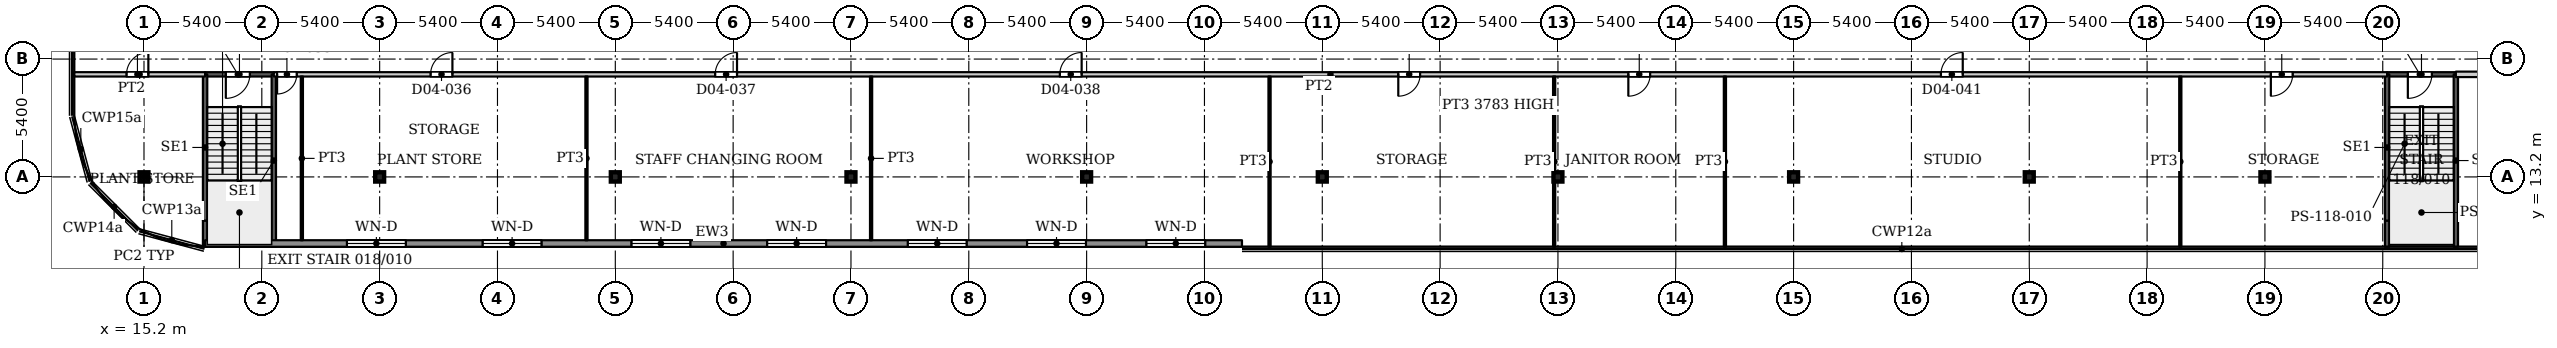
"""IFC4 building model, lengths in metres.
Left out: names, types, materials, properties, quantities, classifications, styles, units other than length and angle.
Written with IfcOpenShell. Run it as: python <this file> out.ifc"""

import sys

from ifc_helpers import new_model, si_unit, direction, frame, frame_2d, origin, origin_2d, place, context, subcontext, project, spatial, rectangle, i_section, extrude, source, transform, mapped, element, fill, save


model = new_model("IFC4")
c1 = context("Model", 3, precision=1e-05, world=origin(), true_north=direction((0.0, 1.0)))
c2 = subcontext(c1, "Body", "Model", "MODEL_VIEW")
j1 = project(units=[si_unit("LENGTHUNIT", "METRE"), si_unit("PLANEANGLEUNIT", "RADIAN")], contexts=[c1])
p1 = place(None, origin())
s1 = spatial("IfcSite", under=j1, at=p1, CompositionType="ELEMENT")
p2 = place(p1, origin())
s2 = spatial("IfcBuilding", under=s1, at=p2, CompositionType="ELEMENT")
p3 = place(p2, frame((0.0, 0.0, 21.5)))
s3 = spatial("IfcBuildingStorey", under=s2, at=p3, CompositionType="ELEMENT", Elevation=21.5)
for number, where, z_axis, x_axis in (
    (1, (15.2, 13.2, 0.0), (0.0, 0.0, 1.0), (1.0, 0.0, 0.0)),
    (2, (26.0, 13.2, 0.0), (0.0, 0.0, 1.0), (1.0, 0.0, 0.0)),
    (3, (36.8, 13.2, 0.0), (0.0, 0.0, 1.0), (1.0, 0.0, 0.0)),
    (4, (47.6, 13.2, 0.0), (0.0, 0.0, 1.0), (1.0, 0.0, 0.0)),
    (5, (58.4, 13.2, 0.0), (0.0, 0.0, 1.0), (1.0, 0.0, 0.0)),
    (6, (69.2, 13.2, 0.0), (0.0, 0.0, 1.0), (1.0, 0.0, 0.0)),
    (7, (80.0, 13.2, 0.0), (0.0, 0.0, 1.0), (1.0, 0.0, 0.0)),
    (8, (90.8, 13.2, 0.0), (0.0, 0.0, 1.0), (1.0, 0.0, 0.0)),
    (9, (101.6, 13.2, 0.0), (0.0, 0.0, 1.0), (1.0, 0.0, 0.0)),
    (10, (112.4, 13.2, 0.0), (0.0, 0.0, 1.0), (1.0, 0.0, 0.0)),
):
    element("IfcColumn", number, at=place(p3, frame(where, z_axis=z_axis, x_axis=x_axis)), inside=s3, PredefinedType="COLUMN", context=c2, shape_type="SweptSolid", body=[
        extrude(i_section(OverallWidth=0.409, OverallDepth=0.425, WebThickness=0.033, FlangeThickness=0.052, FilletRadius=0.013, at=origin_2d()), origin(), (0.0, 0.0, 1.0), 4.5),
    ])
p4 = place(p3, frame((65.52, 10.15, 0.0), z_axis=(0.0, 0.0, 1.0), x_axis=(-1.0, 0.0, 0.0)))
e11 = element("IfcWall", 11, at=p4, inside=s3, PredefinedType="SOLIDWALL", context=c2, shape_type="SweptSolid", body=[
    extrude(rectangle(XDim=47.52, YDim=0.3, at=frame_2d((23.76, 0.0))), origin(), (0.0, 0.0, 1.0), 4.25),
])
p5 = place(p4, frame((1.683, 0.0, 0.9)))
e12 = element("IfcOpeningElement", 12, at=p5, cuts=e11, PredefinedType="OPENING", context=c2, shape_type="SweptSolid", body=[
    extrude(rectangle(XDim=2.7, YDim=2.1, at=frame_2d((1.35, 1.05))), frame((0.0, 0.16, 0.0), z_axis=(0.0, -1.0, 0.0), x_axis=(1.0, 0.0, 0.0)), (0.0, 0.0, 1.0), 0.32),
])
p6 = place(p4, frame((7.15, 0.0, 0.9)))
e13 = element("IfcOpeningElement", 13, at=p6, cuts=e11, PredefinedType="OPENING", context=c2, shape_type="SweptSolid", body=[
    extrude(rectangle(XDim=2.7, YDim=2.1, at=frame_2d((1.35, 1.05))), frame((0.0, 0.16, 0.0), z_axis=(0.0, -1.0, 0.0), x_axis=(1.0, 0.0, 0.0)), (0.0, 0.0, 1.0), 0.32),
])
p7 = place(p4, frame((12.617, 0.0, 0.9)))
e14 = element("IfcOpeningElement", 14, at=p7, cuts=e11, PredefinedType="OPENING", context=c2, shape_type="SweptSolid", body=[
    extrude(rectangle(XDim=2.7, YDim=2.1, at=frame_2d((1.35, 1.05))), frame((0.0, 0.16, 0.0), z_axis=(0.0, -1.0, 0.0), x_axis=(1.0, 0.0, 0.0)), (0.0, 0.0, 1.0), 0.32),
])
p8 = place(p4, frame((19.06, 0.0, 0.9)))
e15 = element("IfcOpeningElement", 15, at=p8, cuts=e11, PredefinedType="OPENING", context=c2, shape_type="SweptSolid", body=[
    extrude(rectangle(XDim=2.7, YDim=2.1, at=frame_2d((1.35, 1.05))), frame((0.0, 0.16, 0.0), z_axis=(0.0, -1.0, 0.0), x_axis=(1.0, 0.0, 0.0)), (0.0, 0.0, 1.0), 0.32),
])
p9 = place(p4, frame((25.28, 0.0, 0.9)))
e16 = element("IfcOpeningElement", 16, at=p9, cuts=e11, PredefinedType="OPENING", context=c2, shape_type="SweptSolid", body=[
    extrude(rectangle(XDim=2.7, YDim=2.1, at=frame_2d((1.35, 1.05))), frame((0.0, 0.16, 0.0), z_axis=(0.0, -1.0, 0.0), x_axis=(1.0, 0.0, 0.0)), (0.0, 0.0, 1.0), 0.32),
])
p10 = place(p4, frame((32.1, 0.0, 0.9)))
e17 = element("IfcOpeningElement", 17, at=p10, cuts=e11, PredefinedType="OPENING", context=c2, shape_type="SweptSolid", body=[
    extrude(rectangle(XDim=2.7, YDim=2.1, at=frame_2d((1.35, 1.05))), frame((0.0, 0.16, 0.0), z_axis=(0.0, -1.0, 0.0), x_axis=(1.0, 0.0, 0.0)), (0.0, 0.0, 1.0), 0.32),
])
p11 = place(p4, frame((38.32, 0.0, 0.9)))
e18 = element("IfcOpeningElement", 18, at=p11, cuts=e11, PredefinedType="OPENING", context=c2, shape_type="SweptSolid", body=[
    extrude(rectangle(XDim=2.7, YDim=2.1, at=frame_2d((1.35, 1.05))), frame((0.0, 0.16, 0.0), z_axis=(0.0, -1.0, 0.0), x_axis=(1.0, 0.0, 0.0)), (0.0, 0.0, 1.0), 0.32),
])
p12 = place(p3, frame((18.0, 17.9, 0.0), z_axis=(0.0, 0.0, 1.0), x_axis=(1.0, 0.0, 0.0)))
e19 = element("IfcWall", 19, at=p12, inside=s3, PredefinedType="SHEAR", context=c2, shape_type="SweptSolid", body=[
    extrude(rectangle(XDim=3.15, YDim=0.2, at=frame_2d((1.575, 0.0))), origin(), (0.0, 0.0, 1.0), 4.5),
])
p13 = place(p12, frame((0.95, 0.0, 0.0)))
e20 = element("IfcOpeningElement", 20, at=p13, cuts=e19, PredefinedType="OPENING", context=c2, shape_type="SweptSolid", body=[
    extrude(rectangle(XDim=1.1, YDim=2.2, at=frame_2d((0.55, 1.1))), frame((0.0, 0.11, 0.0), z_axis=(0.0, -1.0, 0.0), x_axis=(1.0, 0.0, 0.0)), (0.0, 0.0, 1.0), 0.22),
])
p14 = place(p3, frame((18.0, 10.0, 0.0), z_axis=(0.0, 0.0, 1.0), x_axis=(0.0, 1.0, 0.0)))
e21 = element("IfcWall", 21, at=p14, inside=s3, PredefinedType="SHEAR", context=c2, shape_type="SweptSolid", body=[
    extrude(rectangle(XDim=1.2, YDim=0.2, at=frame_2d((0.6, 0.0))), origin(), (0.0, 0.0, 1.0), 4.5),
])
p15 = place(p3, frame((18.0, 11.2, 0.0), z_axis=(0.0, 0.0, 1.0), x_axis=(0.0, 1.0, 0.0)))
e22 = element("IfcWall", 22, at=p15, inside=s3, PredefinedType="SHEAR", context=c2, shape_type="SweptSolid", body=[
    extrude(rectangle(XDim=6.7, YDim=0.2, at=frame_2d((3.35, 0.0))), origin(), (0.0, 0.0, 1.0), 4.5),
])
p16 = place(p3, frame((21.15, 10.0, 0.0), z_axis=(0.0, 0.0, 1.0), x_axis=(0.0, 1.0, 0.0)))
e23 = element("IfcWall", 23, at=p16, inside=s3, PredefinedType="SHEAR", context=c2, shape_type="SweptSolid", body=[
    extrude(rectangle(XDim=7.9, YDim=0.2, at=frame_2d((3.95, 0.0))), origin(), (0.0, 0.0, 1.0), 4.5),
])
p17 = place(p3, frame((118.0, 17.9, 0.0), z_axis=(0.0, 0.0, 1.0), x_axis=(1.0, 0.0, 0.0)))
e24 = element("IfcWall", 24, at=p17, inside=s3, PredefinedType="SHEAR", context=c2, shape_type="SweptSolid", body=[
    extrude(rectangle(XDim=3.15, YDim=0.2, at=frame_2d((1.575, 0.0))), origin(), (0.0, 0.0, 1.0), 4.5),
])
p18 = place(p17, frame((0.95, 0.0, 0.0)))
e25 = element("IfcOpeningElement", 25, at=p18, cuts=e24, PredefinedType="OPENING", context=c2, shape_type="SweptSolid", body=[
    extrude(rectangle(XDim=1.1, YDim=2.2, at=frame_2d((0.55, 1.1))), frame((0.0, 0.11, 0.0), z_axis=(0.0, -1.0, 0.0), x_axis=(1.0, 0.0, 0.0)), (0.0, 0.0, 1.0), 0.22),
])
p19 = place(p3, frame((118.0, 10.0, 0.0), z_axis=(0.0, 0.0, 1.0), x_axis=(0.0, 1.0, 0.0)))
e26 = element("IfcWall", 26, at=p19, inside=s3, PredefinedType="SHEAR", context=c2, shape_type="SweptSolid", body=[
    extrude(rectangle(XDim=1.2, YDim=0.2, at=frame_2d((0.6, 0.0))), origin(), (0.0, 0.0, 1.0), 4.5),
])
p20 = place(p3, frame((118.0, 11.2, 0.0), z_axis=(0.0, 0.0, 1.0), x_axis=(0.0, 1.0, 0.0)))
e27 = element("IfcWall", 27, at=p20, inside=s3, PredefinedType="SHEAR", context=c2, shape_type="SweptSolid", body=[
    extrude(rectangle(XDim=6.7, YDim=0.2, at=frame_2d((3.35, 0.0))), origin(), (0.0, 0.0, 1.0), 4.5),
])
p21 = place(p3, frame((121.15, 10.0, 0.0), z_axis=(0.0, 0.0, 1.0), x_axis=(0.0, 1.0, 0.0)))
e28 = element("IfcWall", 28, at=p21, inside=s3, PredefinedType="SHEAR", context=c2, shape_type="SweptSolid", body=[
    extrude(rectangle(XDim=7.9, YDim=0.2, at=frame_2d((3.95, 0.0))), origin(), (0.0, 0.0, 1.0), 4.5),
])
p22 = place(p3, frame((12.0, 17.9, 0.0), z_axis=(0.0, 0.0, 1.0), x_axis=(1.0, 0.0, 0.0)))
e29 = element("IfcWall", 29, at=p22, inside=s3, PredefinedType="PARTITIONING", context=c2, shape_type="SweptSolid", body=[
    extrude(rectangle(XDim=6.0, YDim=0.2, at=frame_2d((3.0, 0.0))), origin(), (0.0, 0.0, 1.0), 4.18),
])
p23 = place(p22, frame((2.4, 0.0, 0.0)))
e30 = element("IfcOpeningElement", 30, at=p23, cuts=e29, PredefinedType="OPENING", context=c2, shape_type="SweptSolid", body=[
    extrude(rectangle(XDim=1.0, YDim=2.1, at=frame_2d((0.5, 1.05))), frame((0.0, 0.11, 0.0), z_axis=(0.0, -1.0, 0.0), x_axis=(1.0, 0.0, 0.0)), (0.0, 0.0, 1.0), 0.22),
])
p24 = place(p3, frame((21.15, 17.9, 0.0), z_axis=(0.0, 0.0, 1.0), x_axis=(1.0, 0.0, 0.0)))
e31 = element("IfcWall", 31, at=p24, inside=s3, PredefinedType="PARTITIONING", context=c2, shape_type="SweptSolid", body=[
    extrude(rectangle(XDim=96.85, YDim=0.2, at=frame_2d((48.425, 0.0))), origin(), (0.0, 0.0, 1.0), 4.18),
])
p25 = place(p24, frame((0.15, 0.0, 0.0)))
e32 = element("IfcOpeningElement", 32, at=p25, cuts=e31, PredefinedType="OPENING", context=c2, shape_type="SweptSolid", body=[
    extrude(rectangle(XDim=0.9, YDim=2.1, at=frame_2d((0.45, 1.05))), frame((0.0, 0.11, 0.0), z_axis=(0.0, -1.0, 0.0), x_axis=(1.0, 0.0, 0.0)), (0.0, 0.0, 1.0), 0.22),
])
p26 = place(p24, frame((7.185, 0.0, 0.0)))
e33 = element("IfcOpeningElement", 33, at=p26, cuts=e31, PredefinedType="OPENING", context=c2, shape_type="SweptSolid", body=[
    extrude(rectangle(XDim=1.0, YDim=2.1, at=frame_2d((0.5, 1.05))), frame((0.0, 0.11, 0.0), z_axis=(0.0, -1.0, 0.0), x_axis=(1.0, 0.0, 0.0)), (0.0, 0.0, 1.0), 0.22),
])
p27 = place(p24, frame((20.228, 0.0, 0.0)))
e34 = element("IfcOpeningElement", 34, at=p27, cuts=e31, PredefinedType="OPENING", context=c2, shape_type="SweptSolid", body=[
    extrude(rectangle(XDim=1.0, YDim=2.1, at=frame_2d((0.5, 1.05))), frame((0.0, 0.11, 0.0), z_axis=(0.0, -1.0, 0.0), x_axis=(1.0, 0.0, 0.0)), (0.0, 0.0, 1.0), 0.22),
])
p28 = place(p24, frame((36.022, 0.0, 0.0)))
e35 = element("IfcOpeningElement", 35, at=p28, cuts=e31, PredefinedType="OPENING", context=c2, shape_type="SweptSolid", body=[
    extrude(rectangle(XDim=1.0, YDim=2.1, at=frame_2d((0.5, 1.05))), frame((0.0, 0.11, 0.0), z_axis=(0.0, -1.0, 0.0), x_axis=(1.0, 0.0, 0.0)), (0.0, 0.0, 1.0), 0.22),
])
p29 = place(p24, frame((51.533, 0.0, 0.0)))
e36 = element("IfcOpeningElement", 36, at=p29, cuts=e31, PredefinedType="OPENING", context=c2, shape_type="SweptSolid", body=[
    extrude(rectangle(XDim=1.0, YDim=2.1, at=frame_2d((0.5, 1.05))), frame((0.0, 0.11, 0.0), z_axis=(0.0, -1.0, 0.0), x_axis=(1.0, 0.0, 0.0)), (0.0, 0.0, 1.0), 0.22),
])
p30 = place(p24, frame((62.076, 0.0, 0.0)))
e37 = element("IfcOpeningElement", 37, at=p30, cuts=e31, PredefinedType="OPENING", context=c2, shape_type="SweptSolid", body=[
    extrude(rectangle(XDim=1.0, YDim=2.1, at=frame_2d((0.5, 1.05))), frame((0.0, 0.11, 0.0), z_axis=(0.0, -1.0, 0.0), x_axis=(1.0, 0.0, 0.0)), (0.0, 0.0, 1.0), 0.22),
])
p31 = place(p24, frame((76.402, 0.0, 0.0)))
e38 = element("IfcOpeningElement", 38, at=p31, cuts=e31, PredefinedType="OPENING", context=c2, shape_type="SweptSolid", body=[
    extrude(rectangle(XDim=1.0, YDim=2.1, at=frame_2d((0.5, 1.05))), frame((0.0, 0.11, 0.0), z_axis=(0.0, -1.0, 0.0), x_axis=(1.0, 0.0, 0.0)), (0.0, 0.0, 1.0), 0.22),
])
p32 = place(p24, frame((91.522, 0.0, 0.0)))
e39 = element("IfcOpeningElement", 39, at=p32, cuts=e31, PredefinedType="OPENING", context=c2, shape_type="SweptSolid", body=[
    extrude(rectangle(XDim=1.0, YDim=2.1, at=frame_2d((0.5, 1.05))), frame((0.0, 0.11, 0.0), z_axis=(0.0, -1.0, 0.0), x_axis=(1.0, 0.0, 0.0)), (0.0, 0.0, 1.0), 0.22),
])
for number, where, z_axis, x_axis in (
    (40, (22.435, 10.299, 0.0), (0.0, 0.0, 1.0), (0.0, 1.0, 0.0)),
    (41, (35.478, 10.299, 0.0), (0.0, 0.0, 1.0), (0.0, 1.0, 0.0)),
    (42, (48.522, 10.299, 0.0), (0.0, 0.0, 1.0), (0.0, 1.0, 0.0)),
):
    element("IfcWall", number, at=place(p3, frame(where, z_axis=z_axis, x_axis=x_axis)), inside=s3, PredefinedType="PARTITIONING", context=c2, shape_type="SweptSolid", body=[
        extrude(rectangle(XDim=7.501, YDim=0.1, at=frame_2d((3.75, 0.0))), origin(), (0.0, 0.0, 1.0), 4.18),
    ])
p33 = place(p3, frame((66.783, 10.0, 0.0), z_axis=(0.0, 0.0, 1.0), x_axis=(0.0, 1.0, 0.0)))
e43 = element("IfcWall", 43, at=p33, inside=s3, PredefinedType="PARTITIONING", context=c2, shape_type="SweptSolid", body=[
    extrude(rectangle(XDim=7.8, YDim=0.1, at=frame_2d((3.9, 0.0))), origin(), (0.0, 0.0, 1.0), 4.18),
])
p34 = place(p3, frame((79.826, 10.0, 0.0), z_axis=(0.0, 0.0, 1.0), x_axis=(0.0, 1.0, 0.0)))
e44 = element("IfcWall", 44, at=p34, inside=s3, PredefinedType="PARTITIONING", context=c2, shape_type="SweptSolid", body=[
    extrude(rectangle(XDim=7.8, YDim=0.1, at=frame_2d((3.9, 0.0))), origin(), (0.0, 0.0, 1.0), 3.783),
])
for number, where, z_axis, x_axis in (
    (45, (87.652, 10.0, 0.0), (0.0, 0.0, 1.0), (0.0, 1.0, 0.0)),
    (46, (108.522, 10.0, 0.0), (0.0, 0.0, 1.0), (0.0, 1.0, 0.0)),
):
    element("IfcWall", number, at=place(p3, frame(where, z_axis=z_axis, x_axis=x_axis)), inside=s3, PredefinedType="PARTITIONING", context=c2, shape_type="SweptSolid", body=[
        extrude(rectangle(XDim=7.8, YDim=0.1, at=frame_2d((3.9, 0.0))), origin(), (0.0, 0.0, 1.0), 4.18),
    ])
p35 = place(p3, frame((121.15, 17.9, 0.0), z_axis=(0.0, 0.0, 1.0), x_axis=(1.0, 0.0, 0.0)))
e47 = element("IfcWall", 47, at=p35, inside=s3, PredefinedType="PARTITIONING", context=c2, shape_type="SweptSolid", body=[
    extrude(rectangle(XDim=10.551, YDim=0.25, at=frame_2d((5.275, 0.0))), origin(), (0.0, 0.0, 1.0), 4.18),
])
p36 = place(p35, frame((5.065, 0.0, 0.0)))
e48 = element("IfcOpeningElement", 48, at=p36, cuts=e47, PredefinedType="OPENING", context=c2, shape_type="SweptSolid", body=[
    extrude(rectangle(XDim=1.0, YDim=2.1, at=frame_2d((0.5, 1.05))), frame((0.0, 0.135, 0.0), z_axis=(0.0, -1.0, 0.0), x_axis=(1.0, 0.0, 0.0)), (0.0, 0.0, 1.0), 0.27),
])
m1 = source(origin(), c2, "Body", "SweptSolid", [
    extrude(rectangle(XDim=2.7, YDim=2.1, at=frame_2d((1.35, 1.05))), frame((0.0, 0.03, 0.0), z_axis=(0.0, -1.0, 0.0), x_axis=(1.0, 0.0, 0.0)), (0.0, 0.0, 1.0), 0.06),
])
p37 = place(p5, origin())
e49 = element("IfcWindow", 49, at=p37, inside=s3, PartitioningType="SINGLE_PANEL", PredefinedType="WINDOW", context=c2, shape_type="MappedRepresentation", body=[
    mapped(m1, transform((0.0, 0.0, 0.0), x_axis=(1.0, 0.0, 0.0), y_axis=(0.0, 1.0, 0.0), z_axis=(0.0, 0.0, 1.0), scale=1.0)),
])
fill(e12, e49)
p38 = place(p6, origin())
e50 = element("IfcWindow", 50, at=p38, inside=s3, PartitioningType="SINGLE_PANEL", PredefinedType="WINDOW", context=c2, shape_type="MappedRepresentation", body=[
    mapped(m1, transform((0.0, 0.0, 0.0), x_axis=(1.0, 0.0, 0.0), y_axis=(0.0, 1.0, 0.0), z_axis=(0.0, 0.0, 1.0), scale=1.0)),
])
fill(e13, e50)
p39 = place(p7, origin())
e51 = element("IfcWindow", 51, at=p39, inside=s3, PartitioningType="SINGLE_PANEL", PredefinedType="WINDOW", context=c2, shape_type="MappedRepresentation", body=[
    mapped(m1, transform((0.0, 0.0, 0.0), x_axis=(1.0, 0.0, 0.0), y_axis=(0.0, 1.0, 0.0), z_axis=(0.0, 0.0, 1.0), scale=1.0)),
])
fill(e14, e51)
p40 = place(p8, origin())
e52 = element("IfcWindow", 52, at=p40, inside=s3, PartitioningType="SINGLE_PANEL", PredefinedType="WINDOW", context=c2, shape_type="MappedRepresentation", body=[
    mapped(m1, transform((0.0, 0.0, 0.0), x_axis=(1.0, 0.0, 0.0), y_axis=(0.0, 1.0, 0.0), z_axis=(0.0, 0.0, 1.0), scale=1.0)),
])
fill(e15, e52)
p41 = place(p9, origin())
e53 = element("IfcWindow", 53, at=p41, inside=s3, PartitioningType="SINGLE_PANEL", PredefinedType="WINDOW", context=c2, shape_type="MappedRepresentation", body=[
    mapped(m1, transform((0.0, 0.0, 0.0), x_axis=(1.0, 0.0, 0.0), y_axis=(0.0, 1.0, 0.0), z_axis=(0.0, 0.0, 1.0), scale=1.0)),
])
fill(e16, e53)
p42 = place(p10, origin())
e54 = element("IfcWindow", 54, at=p42, inside=s3, PartitioningType="SINGLE_PANEL", PredefinedType="WINDOW", context=c2, shape_type="MappedRepresentation", body=[
    mapped(m1, transform((0.0, 0.0, 0.0), x_axis=(1.0, 0.0, 0.0), y_axis=(0.0, 1.0, 0.0), z_axis=(0.0, 0.0, 1.0), scale=1.0)),
])
fill(e17, e54)
p43 = place(p11, origin())
e55 = element("IfcWindow", 55, at=p43, inside=s3, PartitioningType="SINGLE_PANEL", PredefinedType="WINDOW", context=c2, shape_type="MappedRepresentation", body=[
    mapped(m1, transform((0.0, 0.0, 0.0), x_axis=(1.0, 0.0, 0.0), y_axis=(0.0, 1.0, 0.0), z_axis=(0.0, 0.0, 1.0), scale=1.0)),
])
fill(e18, e55)
m2 = source(origin(), c2, "Body", "SweptSolid", [
    extrude(rectangle(XDim=1.1, YDim=2.2, at=frame_2d((0.55, 1.1))), frame((0.0, 0.025, 0.0), z_axis=(0.0, -1.0, 0.0), x_axis=(1.0, 0.0, 0.0)), (0.0, 0.0, 1.0), 0.05),
])
p44 = place(p13, origin())
e56 = element("IfcDoor", 56, at=p44, inside=s3, OperationType="SINGLE_SWING_RIGHT", PredefinedType="DOOR", context=c2, shape_type="MappedRepresentation", body=[
    mapped(m2, transform((0.0, 0.0, 0.0), x_axis=(1.0, 0.0, 0.0), y_axis=(0.0, 1.0, 0.0), z_axis=(0.0, 0.0, 1.0), scale=1.0)),
])
fill(e20, e56)
p45 = place(p18, origin())
e57 = element("IfcDoor", 57, at=p45, inside=s3, OperationType="SINGLE_SWING_RIGHT", PredefinedType="DOOR", context=c2, shape_type="MappedRepresentation", body=[
    mapped(m2, transform((0.0, 0.0, 0.0), x_axis=(1.0, 0.0, 0.0), y_axis=(0.0, 1.0, 0.0), z_axis=(0.0, 0.0, 1.0), scale=1.0)),
])
fill(e25, e57)
m3 = source(origin(), c2, "Body", "SweptSolid", [
    extrude(rectangle(XDim=1.0, YDim=2.1, at=frame_2d((0.5, 1.05))), frame((0.0, 0.025, 0.0), z_axis=(0.0, -1.0, 0.0), x_axis=(1.0, 0.0, 0.0)), (0.0, 0.0, 1.0), 0.05),
])
p46 = place(p23, origin())
e58 = element("IfcDoor", 58, at=p46, inside=s3, OperationType="SINGLE_SWING_LEFT", PredefinedType="DOOR", context=c2, shape_type="MappedRepresentation", body=[
    mapped(m3, transform((0.0, 0.0, 0.0), x_axis=(1.0, 0.0, 0.0), y_axis=(0.0, 1.0, 0.0), z_axis=(0.0, 0.0, 1.0), scale=1.0)),
])
fill(e30, e58)
m4 = source(origin(), c2, "Body", "SweptSolid", [
    extrude(rectangle(XDim=0.9, YDim=2.1, at=frame_2d((0.45, 1.05))), frame((0.0, 0.025, 0.0), z_axis=(0.0, -1.0, 0.0), x_axis=(1.0, 0.0, 0.0)), (0.0, 0.0, 1.0), 0.05),
])
p47 = place(p25, origin())
e59 = element("IfcDoor", 59, at=p47, inside=s3, OperationType="SINGLE_SWING_RIGHT", PredefinedType="DOOR", context=c2, shape_type="MappedRepresentation", body=[
    mapped(m4, transform((0.0, 0.0, 0.0), x_axis=(1.0, 0.0, 0.0), y_axis=(0.0, 1.0, 0.0), z_axis=(0.0, 0.0, 1.0), scale=1.0)),
])
fill(e32, e59)
p48 = place(p26, origin())
e60 = element("IfcDoor", 60, at=p48, inside=s3, OperationType="SINGLE_SWING_LEFT", PredefinedType="DOOR", context=c2, shape_type="MappedRepresentation", body=[
    mapped(m3, transform((0.0, 0.0, 0.0), x_axis=(1.0, 0.0, 0.0), y_axis=(0.0, 1.0, 0.0), z_axis=(0.0, 0.0, 1.0), scale=1.0)),
])
fill(e33, e60)
p49 = place(p27, origin())
e61 = element("IfcDoor", 61, at=p49, inside=s3, OperationType="SINGLE_SWING_LEFT", PredefinedType="DOOR", context=c2, shape_type="MappedRepresentation", body=[
    mapped(m3, transform((0.0, 0.0, 0.0), x_axis=(1.0, 0.0, 0.0), y_axis=(0.0, 1.0, 0.0), z_axis=(0.0, 0.0, 1.0), scale=1.0)),
])
fill(e34, e61)
p50 = place(p28, origin())
e62 = element("IfcDoor", 62, at=p50, inside=s3, OperationType="SINGLE_SWING_LEFT", PredefinedType="DOOR", context=c2, shape_type="MappedRepresentation", body=[
    mapped(m3, transform((0.0, 0.0, 0.0), x_axis=(1.0, 0.0, 0.0), y_axis=(0.0, 1.0, 0.0), z_axis=(0.0, 0.0, 1.0), scale=1.0)),
])
fill(e35, e62)
p51 = place(p29, origin())
e63 = element("IfcDoor", 63, at=p51, inside=s3, OperationType="SINGLE_SWING_RIGHT", PredefinedType="DOOR", context=c2, shape_type="MappedRepresentation", body=[
    mapped(m3, transform((0.0, 0.0, 0.0), x_axis=(1.0, 0.0, 0.0), y_axis=(0.0, 1.0, 0.0), z_axis=(0.0, 0.0, 1.0), scale=1.0)),
])
fill(e36, e63)
p52 = place(p30, origin())
e64 = element("IfcDoor", 64, at=p52, inside=s3, OperationType="SINGLE_SWING_RIGHT", PredefinedType="DOOR", context=c2, shape_type="MappedRepresentation", body=[
    mapped(m3, transform((0.0, 0.0, 0.0), x_axis=(1.0, 0.0, 0.0), y_axis=(0.0, 1.0, 0.0), z_axis=(0.0, 0.0, 1.0), scale=1.0)),
])
fill(e37, e64)
p53 = place(p31, origin())
e65 = element("IfcDoor", 65, at=p53, inside=s3, OperationType="SINGLE_SWING_LEFT", PredefinedType="DOOR", context=c2, shape_type="MappedRepresentation", body=[
    mapped(m3, transform((0.0, 0.0, 0.0), x_axis=(1.0, 0.0, 0.0), y_axis=(0.0, 1.0, 0.0), z_axis=(0.0, 0.0, 1.0), scale=1.0)),
])
fill(e38, e65)
p54 = place(p32, origin())
e66 = element("IfcDoor", 66, at=p54, inside=s3, OperationType="SINGLE_SWING_RIGHT", PredefinedType="DOOR", context=c2, shape_type="MappedRepresentation", body=[
    mapped(m3, transform((0.0, 0.0, 0.0), x_axis=(1.0, 0.0, 0.0), y_axis=(0.0, 1.0, 0.0), z_axis=(0.0, 0.0, 1.0), scale=1.0)),
])
fill(e39, e66)
save(model, sys.argv[1])
